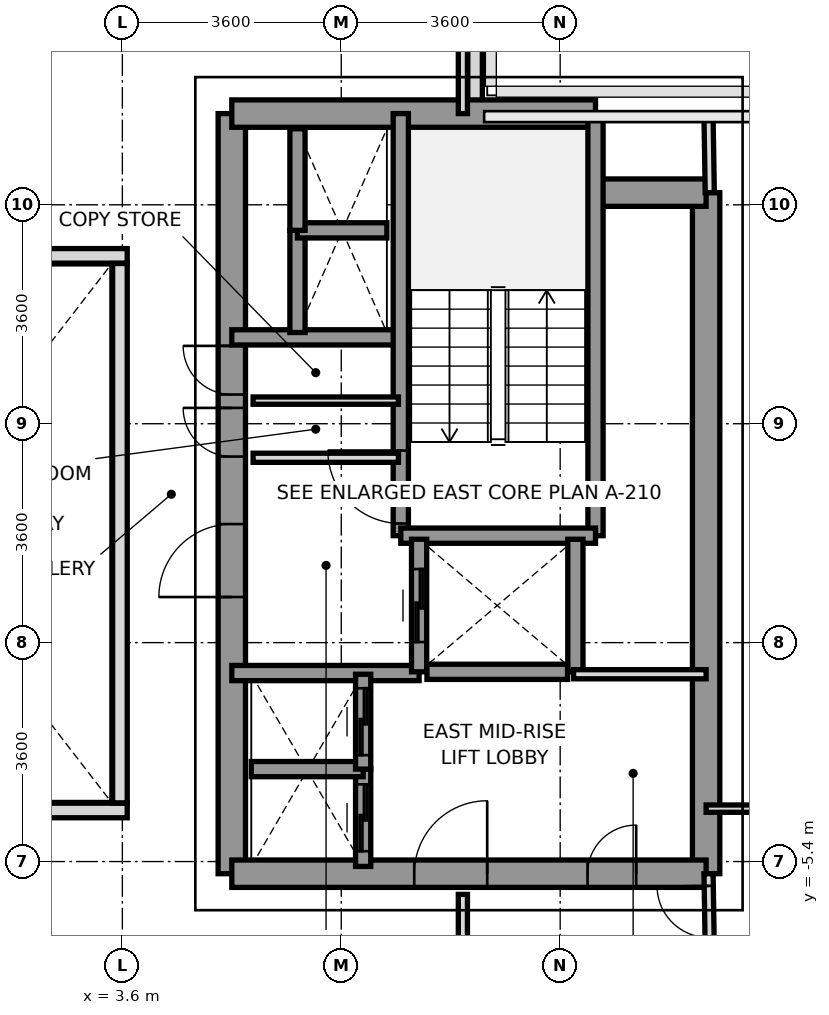
"""IFC4 building model, lengths in metres.
Left out: names, types, materials, properties, quantities, classifications, styles, units other than length and angle.
Written with IfcOpenShell. Run it as: python <this file> out.ifc"""

import sys

from ifc_helpers import new_model, si_unit, direction, frame, frame_2d, origin, place, context, subcontext, project, spatial, rectangle, extrude, source, transform, mapped, element, fill, save


model = new_model("IFC4")
c1 = context("Model", 3, precision=1e-05, world=origin(), true_north=direction((0.0, 1.0)))
c2 = subcontext(c1, "Body", "Model", "MODEL_VIEW")
j1 = project(units=[si_unit("LENGTHUNIT", "METRE"), si_unit("PLANEANGLEUNIT", "RADIAN")], contexts=[c1])
p1 = place(None, origin())
s1 = spatial("IfcSite", under=j1, at=p1, CompositionType="ELEMENT")
p2 = place(p1, origin())
s2 = spatial("IfcBuilding", under=s1, at=p2, CompositionType="ELEMENT")
p3 = place(p2, frame((0.0, 0.0, 121.0)))
s3 = spatial("IfcBuildingStorey", under=s2, at=p3, CompositionType="ELEMENT", Elevation=121.0)
p4 = place(p3, frame((9.4, 8.472, 0.0), z_axis=(0.0, 0.0, 1.0), x_axis=(0.0, -1.0, 0.0)))
e1 = element("IfcWall", 1, at=p4, inside=s3, PredefinedType="PARAPET", context=c2, shape_type="SweptSolid", body=[
    extrude(rectangle(XDim=1.519, YDim=0.24, at=frame_2d((0.76, 0.0))), origin(), (0.0, 0.0, 1.0), 1.15),
])
p5 = place(p3, frame((13.2, -5.6, 0.0), z_axis=(0.0, 0.0, 1.0), x_axis=(0.0, 1.0, 0.0)))
e2 = element("IfcWall", 2, at=p5, inside=s3, PredefinedType="SHEAR", context=c2, shape_type="SweptSolid", body=[
    extrude(rectangle(XDim=11.2, YDim=0.45, at=frame_2d((5.6, 0.0))), origin(), (0.0, 0.0, 1.0), 3.2),
])
p6 = place(p3, frame((5.4, -5.6, 0.0), z_axis=(0.0, 0.0, 1.0), x_axis=(0.0, 1.0, 0.0)))
e3 = element("IfcWall", 3, at=p6, inside=s3, PredefinedType="SHEAR", context=c2, shape_type="SweptSolid", body=[
    extrude(rectangle(XDim=12.5, YDim=0.45, at=frame_2d((6.25, 0.0))), origin(), (0.0, 0.0, 1.0), 3.2),
])
p7 = place(p6, frame((4.55, 0.0, 0.0)))
e4 = element("IfcOpeningElement", 4, at=p7, cuts=e3, PredefinedType="OPENING", context=c2, shape_type="SweptSolid", body=[
    extrude(rectangle(XDim=1.2, YDim=2.2, at=frame_2d((0.6, 1.1))), frame((0.0, 0.235, 0.0), z_axis=(0.0, -1.0, 0.0), x_axis=(1.0, 0.0, 0.0)), (0.0, 0.0, 1.0), 0.47),
])
p8 = place(p6, frame((6.86, 0.0, 0.0)))
e5 = element("IfcOpeningElement", 5, at=p8, cuts=e3, PredefinedType="OPENING", context=c2, shape_type="SweptSolid", body=[
    extrude(rectangle(XDim=0.8, YDim=2.1, at=frame_2d((0.4, 1.05))), frame((0.0, 0.235, 0.0), z_axis=(0.0, -1.0, 0.0), x_axis=(1.0, 0.0, 0.0)), (0.0, 0.0, 1.0), 0.47),
])
p9 = place(p6, frame((7.88, 0.0, 0.0)))
e6 = element("IfcOpeningElement", 6, at=p9, cuts=e3, PredefinedType="OPENING", context=c2, shape_type="SweptSolid", body=[
    extrude(rectangle(XDim=0.8, YDim=2.1, at=frame_2d((0.4, 1.05))), frame((0.0, 0.235, 0.0), z_axis=(0.0, -1.0, 0.0), x_axis=(1.0, 0.0, 0.0)), (0.0, 0.0, 1.0), 0.47),
])
p10 = place(p3, frame((5.4, 6.9, 0.0), z_axis=(0.0, 0.0, 1.0), x_axis=(1.0, 0.0, 0.0)))
e7 = element("IfcWall", 7, at=p10, inside=s3, PredefinedType="SHEAR", context=c2, shape_type="SweptSolid", body=[
    extrude(rectangle(XDim=5.981, YDim=0.45, at=frame_2d((2.991, 0.0))), origin(), (0.0, 0.0, 1.0), 3.2),
])
p11 = place(p3, frame((11.381, 5.6, 0.0), z_axis=(0.0, 0.0, 1.0), x_axis=(1.0, 0.0, 0.0)))
e8 = element("IfcWall", 8, at=p11, inside=s3, PredefinedType="SHEAR", context=c2, shape_type="SweptSolid", body=[
    extrude(rectangle(XDim=1.819, YDim=0.45, at=frame_2d((0.909, 0.0))), origin(), (0.0, 0.0, 1.0), 3.2),
])
p12 = place(p3, frame((5.4, -5.6, 0.0), z_axis=(0.0, 0.0, 1.0), x_axis=(1.0, 0.0, 0.0)))
e9 = element("IfcWall", 9, at=p12, inside=s3, PredefinedType="SHEAR", context=c2, shape_type="SweptSolid", body=[
    extrude(rectangle(XDim=7.8, YDim=0.45, at=frame_2d((3.9, 0.0))), origin(), (0.0, 0.0, 1.0), 3.2),
])
p13 = place(p12, frame((3.0, 0.0, 0.0)))
e10 = element("IfcOpeningElement", 10, at=p13, cuts=e9, PredefinedType="OPENING", context=c2, shape_type="SweptSolid", body=[
    extrude(rectangle(XDim=1.2, YDim=2.2, at=frame_2d((0.6, 1.1))), frame((0.0, 0.235, 0.0), z_axis=(0.0, -1.0, 0.0), x_axis=(1.0, 0.0, 0.0)), (0.0, 0.0, 1.0), 0.47),
])
p14 = place(p12, frame((5.85, 0.0, 0.0)))
e11 = element("IfcOpeningElement", 11, at=p14, cuts=e9, PredefinedType="OPENING", context=c2, shape_type="SweptSolid", body=[
    extrude(rectangle(XDim=0.8, YDim=2.1, at=frame_2d((0.4, 1.05))), frame((0.0, 0.235, 0.0), z_axis=(0.0, -1.0, 0.0), x_axis=(1.0, 0.0, 0.0)), (0.0, 0.0, 1.0), 0.47),
])
p15 = place(p3, frame((5.4, 3.22, 0.0), z_axis=(0.0, 0.0, 1.0), x_axis=(1.0, 0.0, 0.0)))
e12 = element("IfcWall", 12, at=p15, inside=s3, PredefinedType="SOLIDWALL", context=c2, shape_type="SweptSolid", body=[
    extrude(rectangle(XDim=2.78, YDim=0.25, at=frame_2d((1.39, 0.0))), origin(), (0.0, 0.0, 1.0), 3.2),
])
p16 = place(p3, frame((5.4, -2.3, 0.0), z_axis=(0.0, 0.0, 1.0), x_axis=(1.0, 0.0, 0.0)))
e13 = element("IfcWall", 13, at=p16, inside=s3, PredefinedType="SOLIDWALL", context=c2, shape_type="SweptSolid", body=[
    extrude(rectangle(XDim=3.08, YDim=0.25, at=frame_2d((1.54, 0.0))), origin(), (0.0, 0.0, 1.0), 3.2),
])
p17 = place(p3, frame((8.179, -0.041, 0.0), z_axis=(0.0, 0.0, 1.0), x_axis=(0.0, 1.0, 0.0)))
e14 = element("IfcWall", 14, at=p17, inside=s3, PredefinedType="SOLIDWALL", context=c2, shape_type="SweptSolid", body=[
    extrude(rectangle(XDim=6.941, YDim=0.25, at=frame_2d((3.47, 0.0))), origin(), (0.0, 0.0, 1.0), 3.2),
])
p18 = place(p17, frame((0.2, 0.0, 0.0)))
e15 = element("IfcOpeningElement", 15, at=p18, cuts=e14, PredefinedType="OPENING", context=c2, shape_type="SweptSolid", body=[
    extrude(rectangle(XDim=1.2, YDim=2.2, at=frame_2d((0.6, 1.1))), frame((0.0, 0.135, 0.0), z_axis=(0.0, -1.0, 0.0), x_axis=(1.0, 0.0, 0.0)), (0.0, 0.0, 1.0), 0.27),
])
p19 = place(p3, frame((11.381, -0.041, 0.0), z_axis=(0.0, 0.0, 1.0), x_axis=(0.0, 1.0, 0.0)))
e16 = element("IfcWall", 16, at=p19, inside=s3, PredefinedType="SOLIDWALL", context=c2, shape_type="SweptSolid", body=[
    extrude(rectangle(XDim=6.941, YDim=0.25, at=frame_2d((3.47, 0.0))), origin(), (0.0, 0.0, 1.0), 3.2),
])
p20 = place(p3, frame((8.179, -0.041, 0.0), z_axis=(0.0, 0.0, 1.0), x_axis=(1.0, 0.0, 0.0)))
e17 = element("IfcWall", 17, at=p20, inside=s3, PredefinedType="SOLIDWALL", context=c2, shape_type="SweptSolid", body=[
    extrude(rectangle(XDim=3.202, YDim=0.25, at=frame_2d((1.601, 0.0))), origin(), (0.0, 0.0, 1.0), 3.2),
])
p21 = place(p3, frame((8.48, -2.28, 0.0), z_axis=(0.0, 0.0, 1.0), x_axis=(0.0, 1.0, 0.0)))
e18 = element("IfcWall", 18, at=p21, inside=s3, PredefinedType="SOLIDWALL", context=c2, shape_type="SweptSolid", body=[
    extrude(rectangle(XDim=2.18, YDim=0.25, at=frame_2d((1.09, 0.0))), origin(), (0.0, 0.0, 1.0), 3.2),
])
p22 = place(p21, frame((0.49, 0.0, 0.0)))
e19 = element("IfcOpeningElement", 19, at=p22, cuts=e18, PredefinedType="OPENING", context=c2, shape_type="SweptSolid", body=[
    extrude(rectangle(XDim=1.2, YDim=2.2, at=frame_2d((0.6, 1.1))), frame((0.0, 0.135, 0.0), z_axis=(0.0, -1.0, 0.0), x_axis=(1.0, 0.0, 0.0)), (0.0, 0.0, 1.0), 0.27),
])
p23 = place(p3, frame((11.05, -2.28, 0.0), z_axis=(0.0, 0.0, 1.0), x_axis=(0.0, 1.0, 0.0)))
e20 = element("IfcWall", 20, at=p23, inside=s3, PredefinedType="SOLIDWALL", context=c2, shape_type="SweptSolid", body=[
    extrude(rectangle(XDim=2.18, YDim=0.25, at=frame_2d((1.09, 0.0))), origin(), (0.0, 0.0, 1.0), 3.2),
])
p24 = place(p3, frame((8.609, -2.28, 0.0), z_axis=(0.0, 0.0, 1.0), x_axis=(1.0, 0.0, 0.0)))
e21 = element("IfcWall", 21, at=p24, inside=s3, PredefinedType="SOLIDWALL", context=c2, shape_type="SweptSolid", body=[
    extrude(rectangle(XDim=2.312, YDim=0.25, at=frame_2d((1.156, 0.0))), origin(), (0.0, 0.0, 1.0), 3.2),
])
p25 = place(p3, frame((7.56, -5.48, 0.0), z_axis=(0.0, 0.0, 1.0), x_axis=(0.0, 1.0, 0.0)))
e22 = element("IfcWall", 22, at=p25, inside=s3, PredefinedType="SOLIDWALL", context=c2, shape_type="SweptSolid", body=[
    extrude(rectangle(XDim=1.6, YDim=0.25, at=frame_2d((0.8, 0.0))), origin(), (0.0, 0.0, 1.0), 3.2),
])
p26 = place(p25, frame((0.25, 0.0, 0.0)))
e23 = element("IfcOpeningElement", 23, at=p26, cuts=e22, PredefinedType="OPENING", context=c2, shape_type="SweptSolid", body=[
    extrude(rectangle(XDim=1.1, YDim=2.2, at=frame_2d((0.55, 1.1))), frame((0.0, 0.135, 0.0), z_axis=(0.0, -1.0, 0.0), x_axis=(1.0, 0.0, 0.0)), (0.0, 0.0, 1.0), 0.27),
])
p27 = place(p3, frame((5.72, -3.88, 0.0), z_axis=(0.0, 0.0, 1.0), x_axis=(1.0, 0.0, 0.0)))
e24 = element("IfcWall", 24, at=p27, inside=s3, PredefinedType="SOLIDWALL", context=c2, shape_type="SweptSolid", body=[
    extrude(rectangle(XDim=1.84, YDim=0.25, at=frame_2d((0.92, 0.0))), origin(), (0.0, 0.0, 1.0), 3.2),
])
p28 = place(p3, frame((7.56, -3.88, 0.0), z_axis=(0.0, 0.0, 1.0), x_axis=(0.0, 1.0, 0.0)))
e25 = element("IfcWall", 25, at=p28, inside=s3, PredefinedType="SOLIDWALL", context=c2, shape_type="SweptSolid", body=[
    extrude(rectangle(XDim=1.56, YDim=0.25, at=frame_2d((0.78, 0.0))), origin(), (0.0, 0.0, 1.0), 3.2),
])
p29 = place(p28, frame((0.23, 0.0, 0.0)))
e26 = element("IfcOpeningElement", 26, at=p29, cuts=e25, PredefinedType="OPENING", context=c2, shape_type="SweptSolid", body=[
    extrude(rectangle(XDim=1.1, YDim=2.2, at=frame_2d((0.55, 1.1))), frame((0.0, 0.135, 0.0), z_axis=(0.0, -1.0, 0.0), x_axis=(1.0, 0.0, 0.0)), (0.0, 0.0, 1.0), 0.27),
])
p30 = place(p3, frame((6.48, 3.3, 0.0), z_axis=(0.0, 0.0, 1.0), x_axis=(0.0, 1.0, 0.0)))
e27 = element("IfcWall", 27, at=p30, inside=s3, PredefinedType="SOLIDWALL", context=c2, shape_type="SweptSolid", body=[
    extrude(rectangle(XDim=1.68, YDim=0.25, at=frame_2d((0.84, 0.0))), origin(), (0.0, 0.0, 1.0), 3.2),
])
p31 = place(p3, frame((6.48, 4.98, 0.0), z_axis=(0.0, 0.0, 1.0), x_axis=(1.0, 0.0, 0.0)))
e28 = element("IfcWall", 28, at=p31, inside=s3, PredefinedType="SOLIDWALL", context=c2, shape_type="SweptSolid", body=[
    extrude(rectangle(XDim=1.47, YDim=0.25, at=frame_2d((0.735, 0.0))), origin(), (0.0, 0.0, 1.0), 3.2),
])
p32 = place(p3, frame((6.48, 4.98, 0.0), z_axis=(0.0, 0.0, 1.0), x_axis=(0.0, 1.0, 0.0)))
e29 = element("IfcWall", 29, at=p32, inside=s3, PredefinedType="SOLIDWALL", context=c2, shape_type="SweptSolid", body=[
    extrude(rectangle(XDim=1.67, YDim=0.25, at=frame_2d((0.835, 0.0))), origin(), (0.0, 0.0, 1.0), 3.2),
])
p33 = place(p3, frame((5.75, 1.24, 0.0), z_axis=(0.0, 0.0, 1.0), x_axis=(1.0, 0.0, 0.0)))
e30 = element("IfcWall", 30, at=p33, inside=s3, PredefinedType="PARTITIONING", context=c2, shape_type="SweptSolid", body=[
    extrude(rectangle(XDim=2.39, YDim=0.15, at=frame_2d((1.195, 0.0))), origin(), (0.0, 0.0, 1.0), 2.3),
])
p34 = place(p3, frame((5.75, 2.18, 0.0), z_axis=(0.0, 0.0, 1.0), x_axis=(1.0, 0.0, 0.0)))
e31 = element("IfcWall", 31, at=p34, inside=s3, PredefinedType="PARTITIONING", context=c2, shape_type="SweptSolid", body=[
    extrude(rectangle(XDim=2.39, YDim=0.12, at=frame_2d((1.195, 0.0))), origin(), (0.0, 0.0, 1.0), 2.3),
])
p35 = place(p3, frame((11.02, -2.32, 0.0), z_axis=(0.0, 0.0, 1.0), x_axis=(1.0, 0.0, 0.0)))
e32 = element("IfcWall", 32, at=p35, inside=s3, PredefinedType="PARTITIONING", context=c2, shape_type="SweptSolid", body=[
    extrude(rectangle(XDim=2.18, YDim=0.15, at=frame_2d((1.09, 0.0))), origin(), (0.0, 0.0, 1.0), 3.2),
])
p36 = place(p3, frame((9.2, 6.9, 0.0), z_axis=(0.0, 0.0, 1.0), x_axis=(0.0, 1.0, 0.0)))
e33 = element("IfcWall", 33, at=p36, inside=s3, PredefinedType="PARTITIONING", context=c2, shape_type="SweptSolid", body=[
    extrude(rectangle(XDim=8.78, YDim=0.15, at=frame_2d((4.39, 0.0))), origin(), (0.0, 0.0, 1.0), 2.7),
])
p37 = place(p3, frame((9.2, -15.68, 0.0), z_axis=(0.0, 0.0, 1.0), x_axis=(0.0, 1.0, 0.0)))
e34 = element("IfcWall", 34, at=p37, inside=s3, PredefinedType="PARTITIONING", context=c2, shape_type="SweptSolid", body=[
    extrude(rectangle(XDim=9.74, YDim=0.15, at=frame_2d((4.87, 0.0))), origin(), (0.0, 0.0, 1.0), 2.7),
])
p38 = place(p3, frame((13.26, 5.6, 0.0), z_axis=(0.0, 0.0, 1.0), x_axis=(-0.016013571389, 0.999871774545, 0.0)))
e35 = element("IfcWall", 35, at=p38, inside=s3, PredefinedType="PARTITIONING", context=c2, shape_type="SweptSolid", body=[
    extrude(rectangle(XDim=1.25, YDim=0.15, at=frame_2d((0.625, 0.0))), origin(), (0.0, 0.0, 1.0), 3.2),
])
p39 = place(p3, frame((13.26, -6.85, 0.0), z_axis=(0.0, 0.0, 1.0), x_axis=(-0.016013571389, 0.999871774545, 0.0)))
e36 = element("IfcWall", 36, at=p39, inside=s3, PredefinedType="PARTITIONING", context=c2, shape_type="SweptSolid", body=[
    extrude(rectangle(XDim=1.25, YDim=0.15, at=frame_2d((0.625, 0.0))), origin(), (0.0, 0.0, 1.0), 3.2),
])
p40 = place(p39, frame((0.2, 0.0, 0.0)))
e37 = element("IfcOpeningElement", 37, at=p40, cuts=e36, PredefinedType="OPENING", context=c2, shape_type="SweptSolid", body=[
    extrude(rectangle(XDim=0.85, YDim=2.1, at=frame_2d((0.425, 1.05))), frame((0.0, 0.085, 0.0), z_axis=(0.0, -1.0, 0.0), x_axis=(1.0, 0.0, 0.0)), (0.0, 0.0, 1.0), 0.17),
])
p41 = place(p3, frame((13.2, -4.53, 0.0), z_axis=(0.0, 0.0, 1.0), x_axis=(1.0, 0.0, 0.0)))
e38 = element("IfcWall", 38, at=p41, inside=s3, PredefinedType="PARTITIONING", context=c2, shape_type="SweptSolid", body=[
    extrude(rectangle(XDim=10.1, YDim=0.12, at=frame_2d((5.05, 0.0))), origin(), (0.0, 0.0, 1.0), 2.75),
])
p42 = place(p41, frame((7.75, 0.0, 0.0)))
e39 = element("IfcOpeningElement", 39, at=p42, cuts=e38, PredefinedType="OPENING", context=c2, shape_type="SweptSolid", body=[
    extrude(rectangle(XDim=0.95, YDim=2.15, at=frame_2d((0.475, 1.075))), frame((0.0, 0.07, 0.0), z_axis=(0.0, -1.0, 0.0), x_axis=(1.0, 0.0, 0.0)), (0.0, 0.0, 1.0), 0.14),
])
for number, where, z_axis, x_axis in (
    (40, (-3.68, -4.56, 0.0), (0.0, 0.0, 1.0), (1.0, 0.0, 0.0)),
    (41, (-3.68, 4.56, 0.0), (0.0, 0.0, 1.0), (1.0, 0.0, 0.0)),
):
    element("IfcWall", number, at=place(p3, frame(where, z_axis=z_axis, x_axis=x_axis)), inside=s3, PredefinedType="PARAPET", context=c2, shape_type="SweptSolid", body=[
        extrude(rectangle(XDim=7.36, YDim=0.24, at=frame_2d((3.68, 0.0))), origin(), (0.0, 0.0, 1.0), 1.15),
    ])
p43 = place(p3, frame((3.56, -4.435, 0.0), z_axis=(0.0, 0.0, 1.0), x_axis=(0.0, 1.0, 0.0)))
e42 = element("IfcWall", 42, at=p43, inside=s3, PredefinedType="PARAPET", context=c2, shape_type="SweptSolid", body=[
    extrude(rectangle(XDim=8.87, YDim=0.24, at=frame_2d((4.435, 0.0))), origin(), (0.0, 0.0, 1.0), 1.15),
])
m1 = source(origin(), c2, "Body", "SweptSolid", [
    extrude(rectangle(XDim=1.2, YDim=2.2, at=frame_2d((0.6, 1.1))), frame((0.0, 0.025, 0.0), z_axis=(0.0, -1.0, 0.0), x_axis=(1.0, 0.0, 0.0)), (0.0, 0.0, 1.0), 0.05),
])
p44 = place(p18, origin())
e43 = element("IfcDoor", 43, at=p44, inside=s3, OperationType="SINGLE_SWING_RIGHT", PredefinedType="DOOR", context=c2, shape_type="MappedRepresentation", body=[
    mapped(m1, transform((0.0, 0.0, 0.0), x_axis=(1.0, 0.0, 0.0), y_axis=(0.0, 1.0, 0.0), z_axis=(0.0, 0.0, 1.0), scale=1.0)),
])
fill(e15, e43)
p45 = place(p7, origin())
e44 = element("IfcDoor", 44, at=p45, inside=s3, OperationType="SINGLE_SWING_LEFT", PredefinedType="DOOR", context=c2, shape_type="MappedRepresentation", body=[
    mapped(m1, transform((0.0, 0.0, 0.0), x_axis=(1.0, 0.0, 0.0), y_axis=(0.0, 1.0, 0.0), z_axis=(0.0, 0.0, 1.0), scale=1.0)),
])
fill(e4, e44)
p46 = place(p13, origin())
e45 = element("IfcDoor", 45, at=p46, inside=s3, OperationType="SINGLE_SWING_RIGHT", PredefinedType="DOOR", context=c2, shape_type="MappedRepresentation", body=[
    mapped(m1, transform((0.0, 0.0, 0.0), x_axis=(1.0, 0.0, 0.0), y_axis=(0.0, 1.0, 0.0), z_axis=(0.0, 0.0, 1.0), scale=1.0)),
])
fill(e10, e45)
m2 = source(origin(), c2, "Body", "SweptSolid", [
    extrude(rectangle(XDim=0.8, YDim=2.1, at=frame_2d((0.4, 1.05))), frame((0.0, 0.025, 0.0), z_axis=(0.0, -1.0, 0.0), x_axis=(1.0, 0.0, 0.0)), (0.0, 0.0, 1.0), 0.05),
])
p47 = place(p8, origin())
e46 = element("IfcDoor", 46, at=p47, inside=s3, OperationType="SINGLE_SWING_RIGHT", PredefinedType="DOOR", context=c2, shape_type="MappedRepresentation", body=[
    mapped(m2, transform((0.0, 0.0, 0.0), x_axis=(1.0, 0.0, 0.0), y_axis=(0.0, 1.0, 0.0), z_axis=(0.0, 0.0, 1.0), scale=1.0)),
])
fill(e5, e46)
p48 = place(p9, origin())
e47 = element("IfcDoor", 47, at=p48, inside=s3, OperationType="SINGLE_SWING_RIGHT", PredefinedType="DOOR", context=c2, shape_type="MappedRepresentation", body=[
    mapped(m2, transform((0.0, 0.0, 0.0), x_axis=(1.0, 0.0, 0.0), y_axis=(0.0, 1.0, 0.0), z_axis=(0.0, 0.0, 1.0), scale=1.0)),
])
fill(e6, e47)
p49 = place(p14, origin())
e48 = element("IfcDoor", 48, at=p49, inside=s3, OperationType="SINGLE_SWING_RIGHT", PredefinedType="DOOR", context=c2, shape_type="MappedRepresentation", body=[
    mapped(m2, transform((0.0, 0.0, 0.0), x_axis=(1.0, 0.0, 0.0), y_axis=(0.0, 1.0, 0.0), z_axis=(0.0, 0.0, 1.0), scale=1.0)),
])
fill(e11, e48)
p50 = place(p22, origin())
e49 = element("IfcDoor", 49, at=p50, inside=s3, OperationType="SLIDING_TO_RIGHT", PredefinedType="DOOR", context=c2, shape_type="MappedRepresentation", body=[
    mapped(m1, transform((0.0, 0.0, 0.0), x_axis=(1.0, 0.0, 0.0), y_axis=(0.0, 1.0, 0.0), z_axis=(0.0, 0.0, 1.0), scale=1.0)),
])
fill(e19, e49)
m3 = source(origin(), c2, "Body", "SweptSolid", [
    extrude(rectangle(XDim=1.1, YDim=2.2, at=frame_2d((0.55, 1.1))), frame((0.0, 0.025, 0.0), z_axis=(0.0, -1.0, 0.0), x_axis=(1.0, 0.0, 0.0)), (0.0, 0.0, 1.0), 0.05),
])
p51 = place(p26, origin())
e50 = element("IfcDoor", 50, at=p51, inside=s3, OperationType="SLIDING_TO_LEFT", PredefinedType="DOOR", context=c2, shape_type="MappedRepresentation", body=[
    mapped(m3, transform((0.0, 0.0, 0.0), x_axis=(1.0, 0.0, 0.0), y_axis=(0.0, 1.0, 0.0), z_axis=(0.0, 0.0, 1.0), scale=1.0)),
])
fill(e23, e50)
p52 = place(p29, origin())
e51 = element("IfcDoor", 51, at=p52, inside=s3, OperationType="SLIDING_TO_LEFT", PredefinedType="DOOR", context=c2, shape_type="MappedRepresentation", body=[
    mapped(m3, transform((0.0, 0.0, 0.0), x_axis=(1.0, 0.0, 0.0), y_axis=(0.0, 1.0, 0.0), z_axis=(0.0, 0.0, 1.0), scale=1.0)),
])
fill(e26, e51)
m4 = source(origin(), c2, "Body", "SweptSolid", [
    extrude(rectangle(XDim=0.85, YDim=2.1, at=frame_2d((0.425, 1.05))), frame((0.0, 0.025, 0.0), z_axis=(0.0, -1.0, 0.0), x_axis=(1.0, 0.0, 0.0)), (0.0, 0.0, 1.0), 0.05),
])
p53 = place(p40, origin())
e52 = element("IfcDoor", 52, at=p53, inside=s3, OperationType="SINGLE_SWING_RIGHT", PredefinedType="DOOR", context=c2, shape_type="MappedRepresentation", body=[
    mapped(m4, transform((0.0, 0.0, 0.0), x_axis=(1.0, 0.0, 0.0), y_axis=(0.0, 1.0, 0.0), z_axis=(0.0, 0.0, 1.0), scale=1.0)),
])
fill(e37, e52)
save(model, sys.argv[1])
